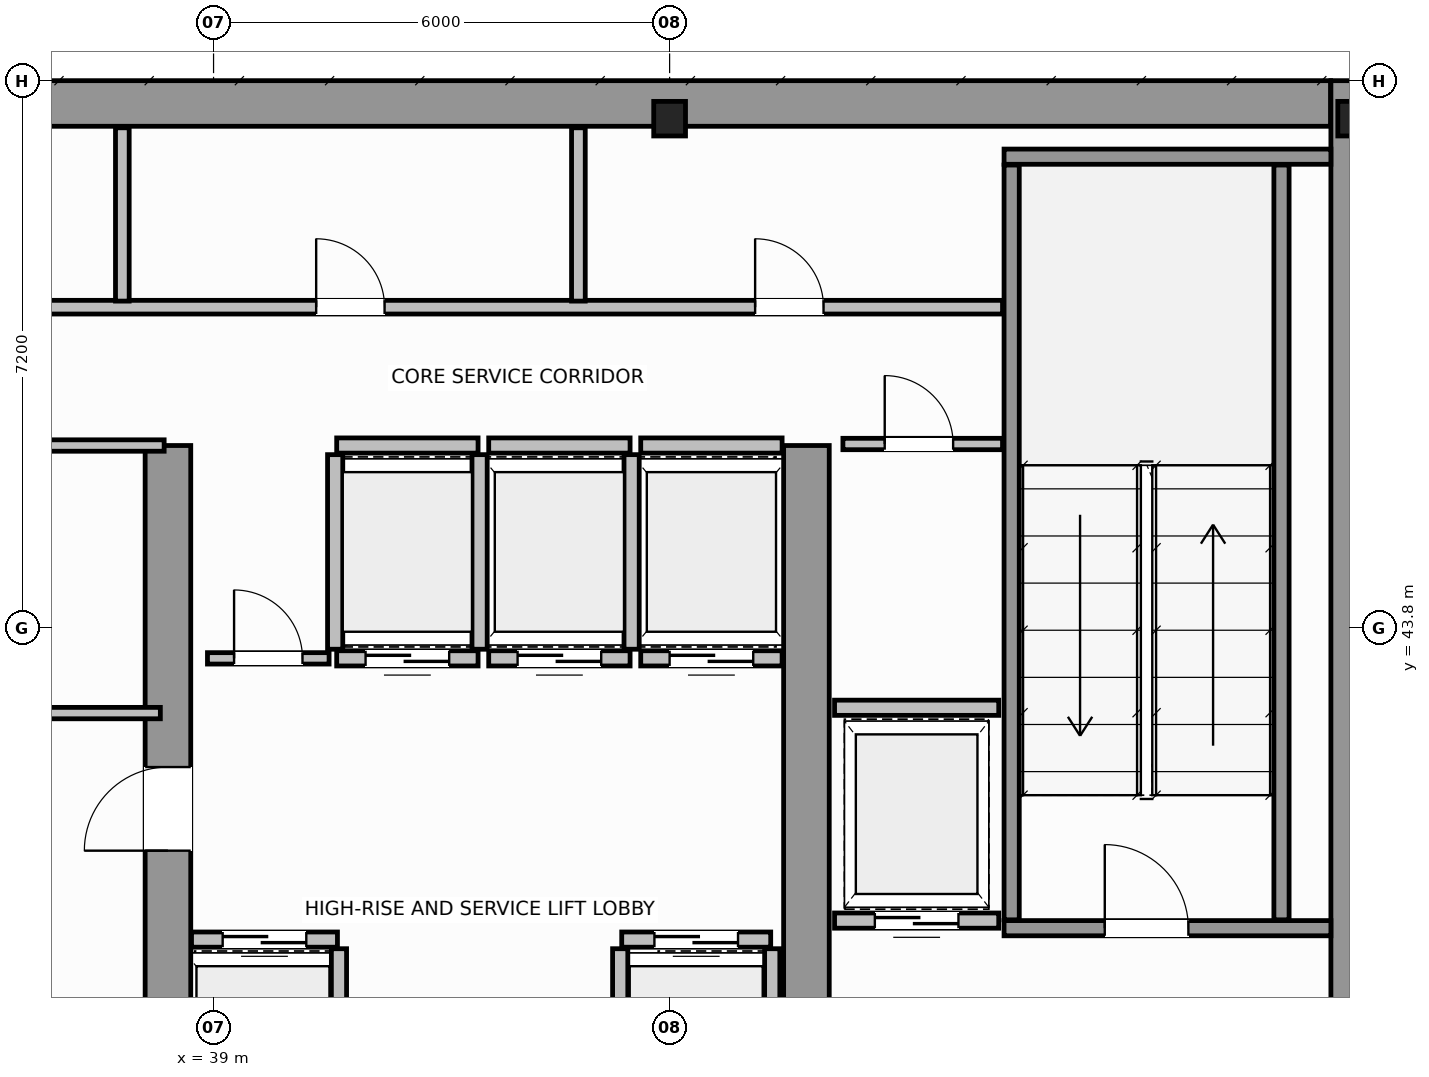
"""IFC4 building model, lengths in metres.
Left out: names, types, materials, properties, quantities, classifications, styles, units other than length and angle.
Written with IfcOpenShell. Run it as: python <this file> out.ifc"""

import sys

from ifc_helpers import new_model, si_unit, direction, frame, frame_2d, origin, origin_2d, place, context, subcontext, project, spatial, rectangle, i_section, extrude, source, transform, mapped, element, fill, save


model = new_model("IFC4")
c1 = context("Model", 3, precision=1e-05, world=origin(), true_north=direction((0.0, 1.0)))
c2 = subcontext(c1, "Body", "Model", "MODEL_VIEW")
j1 = project(units=[si_unit("LENGTHUNIT", "METRE"), si_unit("PLANEANGLEUNIT", "RADIAN")], contexts=[c1])
p1 = place(None, origin())
s1 = spatial("IfcSite", under=j1, at=p1, CompositionType="ELEMENT")
p2 = place(p1, origin())
s2 = spatial("IfcBuilding", under=s1, at=p2, CompositionType="ELEMENT")
p3 = place(p2, frame((0.0, 0.0, 218.4)))
s3 = spatial("IfcBuildingStorey", under=s2, at=p3, CompositionType="ELEMENT", Elevation=218.4)
m1 = source(origin(), c2, "Body", "SweptSolid", [
    extrude(i_section(OverallWidth=0.418, OverallDepth=0.455, WebThickness=0.042, FlangeThickness=0.058, FilletRadius=0.015, at=origin_2d()), origin(), (0.0, 0.0, 1.0), 4.8),
])
for number, where, z_axis, x_axis in (
    (1, (45.0, 50.5, 0.0), (0.0, 0.0, 1.0), (1.0, 0.0, 0.0)),
    (2, (54.0, 50.5, 0.0), (0.0, 0.0, 1.0), (1.0, 0.0, 0.0)),
):
    element("IfcColumn", number, at=place(p3, frame(where, z_axis=z_axis, x_axis=x_axis)), inside=s3, PredefinedType="COLUMN", context=c2, shape_type="MappedRepresentation", body=[
        mapped(m1, transform((0.0, 0.0, 0.0), scale=1.0)),
    ])
p4 = place(p3, frame((34.002, 50.7, 0.0), z_axis=(0.0, 0.0, 1.0), x_axis=(1.0, 0.0, 0.0)))
e3 = element("IfcWall", 3, at=p4, inside=s3, PredefinedType="SHEAR", context=c2, shape_type="SweptSolid", body=[
    extrude(rectangle(XDim=19.694, YDim=0.6, at=frame_2d((9.847, 0.0))), origin(), (0.0, 0.0, 1.0), 4.8),
])
p5 = place(p3, frame((54.0, 36.5, 0.0), z_axis=(0.0, 0.0, 1.0), x_axis=(0.0, 1.0, 0.0)))
e4 = element("IfcWall", 4, at=p5, inside=s3, PredefinedType="SHEAR", context=c2, shape_type="SweptSolid", body=[
    extrude(rectangle(XDim=14.5, YDim=0.6, at=frame_2d((7.25, 0.0))), origin(), (0.0, 0.0, 1.0), 4.8),
])
p6 = place(p3, frame((38.4, 36.82, 0.0), z_axis=(0.0, 0.0, 1.0), x_axis=(0.0, 1.0, 0.0)))
e5 = element("IfcWall", 5, at=p6, inside=s3, PredefinedType="SHEAR", context=c2, shape_type="SweptSolid", body=[
    extrude(rectangle(XDim=9.38, YDim=0.6, at=frame_2d((4.69, 0.0))), origin(), (0.0, 0.0, 1.0), 4.8),
])
p7 = place(p6, frame((4.05, 0.0, 0.0)))
e6 = element("IfcOpeningElement", 6, at=p7, cuts=e5, PredefinedType="OPENING", context=c2, shape_type="SweptSolid", body=[
    extrude(rectangle(XDim=1.1, YDim=2.15, at=frame_2d((0.55, 1.075))), frame((0.0, 0.31, 0.0), z_axis=(0.0, -1.0, 0.0), x_axis=(1.0, 0.0, 0.0)), (0.0, 0.0, 1.0), 0.62),
])
p8 = place(p3, frame((46.8, 36.82, 0.0), z_axis=(0.0, 0.0, 1.0), x_axis=(0.0, 1.0, 0.0)))
e7 = element("IfcWall", 7, at=p8, inside=s3, PredefinedType="SHEAR", context=c2, shape_type="SweptSolid", body=[
    extrude(rectangle(XDim=9.38, YDim=0.6, at=frame_2d((4.69, 0.0))), origin(), (0.0, 0.0, 1.0), 4.8),
])
p9 = place(p3, frame((49.4, 39.85, 0.0), z_axis=(0.0, 0.0, 1.0), x_axis=(1.0, 0.0, 0.0)))
e8 = element("IfcWall", 8, at=p9, inside=s3, PredefinedType="SOLIDWALL", context=c2, shape_type="SweptSolid", body=[
    extrude(rectangle(XDim=4.3, YDim=0.2, at=frame_2d((2.15, 0.0))), origin(), (0.0, 0.0, 1.0), 4.8),
])
p10 = place(p9, frame((1.325, 0.0, 0.0)))
e9 = element("IfcOpeningElement", 9, at=p10, cuts=e8, PredefinedType="OPENING", context=c2, shape_type="SweptSolid", body=[
    extrude(rectangle(XDim=1.1, YDim=2.15, at=frame_2d((0.55, 1.075))), frame((0.0, 0.11, 0.0), z_axis=(0.0, -1.0, 0.0), x_axis=(1.0, 0.0, 0.0)), (0.0, 0.0, 1.0), 0.22),
])
p11 = place(p3, frame((49.4, 50.0, 0.0), z_axis=(0.0, 0.0, 1.0), x_axis=(1.0, 0.0, 0.0)))
e10 = element("IfcWall", 10, at=p11, inside=s3, PredefinedType="SOLIDWALL", context=c2, shape_type="SweptSolid", body=[
    extrude(rectangle(XDim=4.3, YDim=0.2, at=frame_2d((2.15, 0.0))), origin(), (0.0, 0.0, 1.0), 4.8),
])
for number, where, z_axis, x_axis in (
    (11, (49.5, 39.96, 0.0), (0.0, 0.0, 1.0), (0.0, 1.0, 0.0)),
    (12, (53.05, 39.96, 0.0), (0.0, 0.0, 1.0), (0.0, 1.0, 0.0)),
):
    element("IfcWall", number, at=place(p3, frame(where, z_axis=z_axis, x_axis=x_axis)), inside=s3, PredefinedType="SOLIDWALL", context=c2, shape_type="SweptSolid", body=[
        extrude(rectangle(XDim=9.93, YDim=0.2, at=frame_2d((4.965, 0.0))), origin(), (0.0, 0.0, 1.0), 4.8),
    ])
p12 = place(p3, frame((38.71, 39.7, 0.0), z_axis=(0.0, 0.0, 1.0), x_axis=(1.0, 0.0, 0.0)))
e13 = element("IfcWall", 13, at=p12, inside=s3, PredefinedType="SOLIDWALL", context=c2, shape_type="SweptSolid", body=[
    extrude(rectangle(XDim=1.92, YDim=0.2, at=frame_2d((0.96, 0.0))), origin(), (0.0, 0.0, 1.0), 4.54),
])
p13 = place(p12, frame((0.41, 0.0, 0.0)))
e14 = element("IfcOpeningElement", 14, at=p13, cuts=e13, PredefinedType="OPENING", context=c2, shape_type="SweptSolid", body=[
    extrude(rectangle(XDim=1.1, YDim=2.15, at=frame_2d((0.55, 1.075))), frame((0.0, 0.11, 0.0), z_axis=(0.0, -1.0, 0.0), x_axis=(1.0, 0.0, 0.0)), (0.0, 0.0, 1.0), 0.22),
])
p14 = place(p3, frame((40.65, 37.02, 0.0), z_axis=(0.0, 0.0, 1.0), x_axis=(0.0, 1.0, 0.0)))
e15 = element("IfcWall", 15, at=p14, inside=s3, PredefinedType="SOLIDWALL", context=c2, shape_type="SweptSolid", body=[
    extrude(rectangle(XDim=2.56, YDim=0.2, at=frame_2d((1.28, 0.0))), origin(), (0.0, 0.0, 1.0), 4.54),
])
p15 = place(p3, frame((44.37, 39.7, 0.0), z_axis=(0.0, 0.0, 1.0), x_axis=(1.0, 0.0, 0.0)))
e16 = element("IfcWall", 16, at=p15, inside=s3, PredefinedType="SOLIDWALL", context=c2, shape_type="SweptSolid", body=[
    extrude(rectangle(XDim=1.96, YDim=0.2, at=frame_2d((0.98, 0.0))), origin(), (0.0, 0.0, 1.0), 4.54),
])
p16 = place(p15, frame((0.43, 0.0, 0.0)))
e17 = element("IfcOpeningElement", 17, at=p16, cuts=e16, PredefinedType="OPENING", context=c2, shape_type="SweptSolid", body=[
    extrude(rectangle(XDim=1.1, YDim=2.15, at=frame_2d((0.55, 1.075))), frame((0.0, 0.11, 0.0), z_axis=(0.0, -1.0, 0.0), x_axis=(1.0, 0.0, 0.0)), (0.0, 0.0, 1.0), 0.22),
])
for number, where, z_axis, x_axis in (
    (18, (44.35, 37.02, 0.0), (0.0, 0.0, 1.0), (0.0, 1.0, 0.0)),
    (19, (46.35, 37.02, 0.0), (0.0, 0.0, 1.0), (0.0, 1.0, 0.0)),
):
    element("IfcWall", number, at=place(p3, frame(where, z_axis=z_axis, x_axis=x_axis)), inside=s3, PredefinedType="SOLIDWALL", context=c2, shape_type="SweptSolid", body=[
        extrude(rectangle(XDim=2.56, YDim=0.2, at=frame_2d((1.28, 0.0))), origin(), (0.0, 0.0, 1.0), 4.54),
    ])
p17 = place(p3, frame((40.62, 43.4, 0.0), z_axis=(0.0, 0.0, 1.0), x_axis=(1.0, 0.0, 0.0)))
e20 = element("IfcWall", 20, at=p17, inside=s3, PredefinedType="SOLIDWALL", context=c2, shape_type="SweptSolid", body=[
    extrude(rectangle(XDim=1.86, YDim=0.2, at=frame_2d((0.93, 0.0))), origin(), (0.0, 0.0, 1.0), 4.54),
])
p18 = place(p17, frame((0.38, 0.0, 0.0)))
e21 = element("IfcOpeningElement", 21, at=p18, cuts=e20, PredefinedType="OPENING", context=c2, shape_type="SweptSolid", body=[
    extrude(rectangle(XDim=1.1, YDim=2.15, at=frame_2d((0.55, 1.075))), frame((0.0, 0.11, 0.0), z_axis=(0.0, -1.0, 0.0), x_axis=(1.0, 0.0, 0.0)), (0.0, 0.0, 1.0), 0.22),
])
p19 = place(p3, frame((40.62, 46.2, 0.0), z_axis=(0.0, 0.0, 1.0), x_axis=(1.0, 0.0, 0.0)))
e22 = element("IfcWall", 22, at=p19, inside=s3, PredefinedType="SOLIDWALL", context=c2, shape_type="SweptSolid", body=[
    extrude(rectangle(XDim=1.86, YDim=0.2, at=frame_2d((0.93, 0.0))), origin(), (0.0, 0.0, 1.0), 4.54),
])
for number, where, z_axis, x_axis in (
    (23, (40.6, 43.52, 0.0), (0.0, 0.0, 1.0), (0.0, 1.0, 0.0)),
    (24, (42.5, 43.52, 0.0), (0.0, 0.0, 1.0), (0.0, 1.0, 0.0)),
):
    element("IfcWall", number, at=place(p3, frame(where, z_axis=z_axis, x_axis=x_axis)), inside=s3, PredefinedType="SOLIDWALL", context=c2, shape_type="SweptSolid", body=[
        extrude(rectangle(XDim=2.56, YDim=0.2, at=frame_2d((1.28, 0.0))), origin(), (0.0, 0.0, 1.0), 4.54),
    ])
p20 = place(p3, frame((42.62, 43.4, 0.0), z_axis=(0.0, 0.0, 1.0), x_axis=(1.0, 0.0, 0.0)))
e25 = element("IfcWall", 25, at=p20, inside=s3, PredefinedType="SOLIDWALL", context=c2, shape_type="SweptSolid", body=[
    extrude(rectangle(XDim=1.86, YDim=0.2, at=frame_2d((0.93, 0.0))), origin(), (0.0, 0.0, 1.0), 4.54),
])
p21 = place(p20, frame((0.38, 0.0, 0.0)))
e26 = element("IfcOpeningElement", 26, at=p21, cuts=e25, PredefinedType="OPENING", context=c2, shape_type="SweptSolid", body=[
    extrude(rectangle(XDim=1.1, YDim=2.15, at=frame_2d((0.55, 1.075))), frame((0.0, 0.11, 0.0), z_axis=(0.0, -1.0, 0.0), x_axis=(1.0, 0.0, 0.0)), (0.0, 0.0, 1.0), 0.22),
])
p22 = place(p3, frame((42.62, 46.2, 0.0), z_axis=(0.0, 0.0, 1.0), x_axis=(1.0, 0.0, 0.0)))
e27 = element("IfcWall", 27, at=p22, inside=s3, PredefinedType="SOLIDWALL", context=c2, shape_type="SweptSolid", body=[
    extrude(rectangle(XDim=1.86, YDim=0.2, at=frame_2d((0.93, 0.0))), origin(), (0.0, 0.0, 1.0), 4.54),
])
p23 = place(p3, frame((44.5, 43.52, 0.0), z_axis=(0.0, 0.0, 1.0), x_axis=(0.0, 1.0, 0.0)))
e28 = element("IfcWall", 28, at=p23, inside=s3, PredefinedType="SOLIDWALL", context=c2, shape_type="SweptSolid", body=[
    extrude(rectangle(XDim=2.56, YDim=0.2, at=frame_2d((1.28, 0.0))), origin(), (0.0, 0.0, 1.0), 4.54),
])
p24 = place(p3, frame((44.62, 43.4, 0.0), z_axis=(0.0, 0.0, 1.0), x_axis=(1.0, 0.0, 0.0)))
e29 = element("IfcWall", 29, at=p24, inside=s3, PredefinedType="SOLIDWALL", context=c2, shape_type="SweptSolid", body=[
    extrude(rectangle(XDim=1.86, YDim=0.2, at=frame_2d((0.93, 0.0))), origin(), (0.0, 0.0, 1.0), 4.54),
])
p25 = place(p24, frame((0.38, 0.0, 0.0)))
e30 = element("IfcOpeningElement", 30, at=p25, cuts=e29, PredefinedType="OPENING", context=c2, shape_type="SweptSolid", body=[
    extrude(rectangle(XDim=1.1, YDim=2.15, at=frame_2d((0.55, 1.075))), frame((0.0, 0.11, 0.0), z_axis=(0.0, -1.0, 0.0), x_axis=(1.0, 0.0, 0.0)), (0.0, 0.0, 1.0), 0.22),
])
p26 = place(p3, frame((44.62, 46.2, 0.0), z_axis=(0.0, 0.0, 1.0), x_axis=(1.0, 0.0, 0.0)))
e31 = element("IfcWall", 31, at=p26, inside=s3, PredefinedType="SOLIDWALL", context=c2, shape_type="SweptSolid", body=[
    extrude(rectangle(XDim=1.86, YDim=0.2, at=frame_2d((0.93, 0.0))), origin(), (0.0, 0.0, 1.0), 4.54),
])
p27 = place(p3, frame((47.17, 39.95, 0.0), z_axis=(0.0, 0.0, 1.0), x_axis=(1.0, 0.0, 0.0)))
e32 = element("IfcWall", 32, at=p27, inside=s3, PredefinedType="SOLIDWALL", context=c2, shape_type="SweptSolid", body=[
    extrude(rectangle(XDim=2.16, YDim=0.2, at=frame_2d((1.08, 0.0))), origin(), (0.0, 0.0, 1.0), 4.54),
])
p28 = place(p27, frame((0.53, 0.0, 0.0)))
e33 = element("IfcOpeningElement", 33, at=p28, cuts=e32, PredefinedType="OPENING", context=c2, shape_type="SweptSolid", body=[
    extrude(rectangle(XDim=1.1, YDim=2.15, at=frame_2d((0.55, 1.075))), frame((0.0, 0.11, 0.0), z_axis=(0.0, -1.0, 0.0), x_axis=(1.0, 0.0, 0.0)), (0.0, 0.0, 1.0), 0.22),
])
p29 = place(p3, frame((47.17, 42.75, 0.0), z_axis=(0.0, 0.0, 1.0), x_axis=(1.0, 0.0, 0.0)))
e34 = element("IfcWall", 34, at=p29, inside=s3, PredefinedType="SOLIDWALL", context=c2, shape_type="SweptSolid", body=[
    extrude(rectangle(XDim=2.16, YDim=0.2, at=frame_2d((1.08, 0.0))), origin(), (0.0, 0.0, 1.0), 4.54),
])
p30 = place(p3, frame((29.85, 46.2, 0.0), z_axis=(0.0, 0.0, 1.0), x_axis=(1.0, 0.0, 0.0)))
e35 = element("IfcWall", 35, at=p30, inside=s3, PredefinedType="PARTITIONING", context=c2, shape_type="SweptSolid", body=[
    extrude(rectangle(XDim=8.5, YDim=0.15, at=frame_2d((4.25, 0.0))), origin(), (0.0, 0.0, 1.0), 4.54),
])
p31 = place(p3, frame((29.9, 42.68, 0.0), z_axis=(0.0, 0.0, 1.0), x_axis=(1.0, 0.0, 0.0)))
e36 = element("IfcWall", 36, at=p31, inside=s3, PredefinedType="PARTITIONING", context=c2, shape_type="SweptSolid", body=[
    extrude(rectangle(XDim=8.4, YDim=0.15, at=frame_2d((4.2, 0.0))), origin(), (0.0, 0.0, 1.0), 4.54),
])
p32 = place(p31, frame((3.4, 0.0, 0.0)))
e37 = element("IfcOpeningElement", 37, at=p32, cuts=e36, PredefinedType="OPENING", context=c2, shape_type="SweptSolid", body=[
    extrude(rectangle(XDim=0.9, YDim=2.1, at=frame_2d((0.45, 1.05))), frame((0.0, 0.085, 0.0), z_axis=(0.0, -1.0, 0.0), x_axis=(1.0, 0.0, 0.0)), (0.0, 0.0, 1.0), 0.17),
])
p33 = place(p3, frame((47.28, 46.22, 0.0), z_axis=(0.0, 0.0, 1.0), x_axis=(1.0, 0.0, 0.0)))
e38 = element("IfcWall", 38, at=p33, inside=s3, PredefinedType="PARTITIONING", context=c2, shape_type="SweptSolid", body=[
    extrude(rectangle(XDim=2.1, YDim=0.15, at=frame_2d((1.05, 0.0))), origin(), (0.0, 0.0, 1.0), 4.54),
])
p34 = place(p33, frame((0.55, 0.0, 0.0)))
e39 = element("IfcOpeningElement", 39, at=p34, cuts=e38, PredefinedType="OPENING", context=c2, shape_type="SweptSolid", body=[
    extrude(rectangle(XDim=0.9, YDim=2.1, at=frame_2d((0.45, 1.05))), frame((0.0, 0.085, 0.0), z_axis=(0.0, -1.0, 0.0), x_axis=(1.0, 0.0, 0.0)), (0.0, 0.0, 1.0), 0.17),
])
p35 = place(p3, frame((38.92, 43.4, 0.0), z_axis=(0.0, 0.0, 1.0), x_axis=(1.0, 0.0, 0.0)))
e40 = element("IfcWall", 40, at=p35, inside=s3, PredefinedType="PARTITIONING", context=c2, shape_type="SweptSolid", body=[
    extrude(rectangle(XDim=1.6, YDim=0.15, at=frame_2d((0.8, 0.0))), origin(), (0.0, 0.0, 1.0), 4.54),
])
p36 = place(p35, frame((0.35, 0.0, 0.0)))
e41 = element("IfcOpeningElement", 41, at=p36, cuts=e40, PredefinedType="OPENING", context=c2, shape_type="SweptSolid", body=[
    extrude(rectangle(XDim=0.9, YDim=2.1, at=frame_2d((0.45, 1.05))), frame((0.0, 0.085, 0.0), z_axis=(0.0, -1.0, 0.0), x_axis=(1.0, 0.0, 0.0)), (0.0, 0.0, 1.0), 0.17),
])
p37 = place(p3, frame((18.62, 48.02, 0.0), z_axis=(0.0, 0.0, 1.0), x_axis=(1.0, 0.0, 0.0)))
e42 = element("IfcWall", 42, at=p37, inside=s3, PredefinedType="PLUMBINGWALL", context=c2, shape_type="SweptSolid", body=[
    extrude(rectangle(XDim=30.76, YDim=0.18, at=frame_2d((15.38, 0.0))), origin(), (0.0, 0.0, 1.0), 4.54),
])
p38 = place(p37, frame((1.655, 0.0, 0.0)))
e43 = element("IfcOpeningElement", 43, at=p38, cuts=e42, PredefinedType="OPENING", context=c2, shape_type="SweptSolid", body=[
    extrude(rectangle(XDim=0.9, YDim=2.15, at=frame_2d((0.45, 1.075))), frame((0.0, 0.1, 0.0), z_axis=(0.0, -1.0, 0.0), x_axis=(1.0, 0.0, 0.0)), (0.0, 0.0, 1.0), 0.2),
])
p39 = place(p37, frame((6.03, 0.0, 0.0)))
e44 = element("IfcOpeningElement", 44, at=p39, cuts=e42, PredefinedType="OPENING", context=c2, shape_type="SweptSolid", body=[
    extrude(rectangle(XDim=0.9, YDim=2.15, at=frame_2d((0.45, 1.075))), frame((0.0, 0.1, 0.0), z_axis=(0.0, -1.0, 0.0), x_axis=(1.0, 0.0, 0.0)), (0.0, 0.0, 1.0), 0.2),
])
p40 = place(p37, frame((10.93, 0.0, 0.0)))
e45 = element("IfcOpeningElement", 45, at=p40, cuts=e42, PredefinedType="OPENING", context=c2, shape_type="SweptSolid", body=[
    extrude(rectangle(XDim=0.9, YDim=2.15, at=frame_2d((0.45, 1.075))), frame((0.0, 0.1, 0.0), z_axis=(0.0, -1.0, 0.0), x_axis=(1.0, 0.0, 0.0)), (0.0, 0.0, 1.0), 0.2),
])
p41 = place(p37, frame((16.13, 0.0, 0.0)))
e46 = element("IfcOpeningElement", 46, at=p41, cuts=e42, PredefinedType="OPENING", context=c2, shape_type="SweptSolid", body=[
    extrude(rectangle(XDim=0.9, YDim=2.15, at=frame_2d((0.45, 1.075))), frame((0.0, 0.1, 0.0), z_axis=(0.0, -1.0, 0.0), x_axis=(1.0, 0.0, 0.0)), (0.0, 0.0, 1.0), 0.2),
])
p42 = place(p37, frame((21.73, 0.0, 0.0)))
e47 = element("IfcOpeningElement", 47, at=p42, cuts=e42, PredefinedType="OPENING", context=c2, shape_type="SweptSolid", body=[
    extrude(rectangle(XDim=0.9, YDim=2.15, at=frame_2d((0.45, 1.075))), frame((0.0, 0.1, 0.0), z_axis=(0.0, -1.0, 0.0), x_axis=(1.0, 0.0, 0.0)), (0.0, 0.0, 1.0), 0.2),
])
p43 = place(p37, frame((27.505, 0.0, 0.0)))
e48 = element("IfcOpeningElement", 48, at=p43, cuts=e42, PredefinedType="OPENING", context=c2, shape_type="SweptSolid", body=[
    extrude(rectangle(XDim=0.9, YDim=2.15, at=frame_2d((0.45, 1.075))), frame((0.0, 0.1, 0.0), z_axis=(0.0, -1.0, 0.0), x_axis=(1.0, 0.0, 0.0)), (0.0, 0.0, 1.0), 0.2),
])
for number, where, z_axis, x_axis in (
    (49, (37.8, 48.1, 0.0), (0.0, 0.0, 1.0), (0.0, 1.0, 0.0)),
    (50, (43.8, 48.1, 0.0), (0.0, 0.0, 1.0), (0.0, 1.0, 0.0)),
):
    element("IfcWall", number, at=place(p3, frame(where, z_axis=z_axis, x_axis=x_axis)), inside=s3, PredefinedType="PLUMBINGWALL", context=c2, shape_type="SweptSolid", body=[
        extrude(rectangle(XDim=2.28, YDim=0.18, at=frame_2d((1.14, 0.0))), origin(), (0.0, 0.0, 1.0), 4.54),
    ])
m2 = source(origin(), c2, "Body", "SweptSolid", [
    extrude(rectangle(XDim=1.1, YDim=2.15, at=frame_2d((0.55, 1.075))), frame((0.0, 0.025, 0.0), z_axis=(0.0, -1.0, 0.0), x_axis=(1.0, 0.0, 0.0)), (0.0, 0.0, 1.0), 0.05),
])
p44 = place(p10, origin())
e51 = element("IfcDoor", 51, at=p44, inside=s3, OperationType="SINGLE_SWING_RIGHT", PredefinedType="DOOR", context=c2, shape_type="MappedRepresentation", body=[
    mapped(m2, transform((0.0, 0.0, 0.0), scale=1.0)),
])
fill(e9, e51)
p45 = place(p13, origin())
e52 = element("IfcDoor", 52, at=p45, inside=s3, OperationType="DOUBLE_DOOR_SLIDING", PredefinedType="DOOR", context=c2, shape_type="MappedRepresentation", body=[
    mapped(m2, transform((0.0, 0.0, 0.0), scale=1.0)),
])
fill(e14, e52)
p46 = place(p16, origin())
e53 = element("IfcDoor", 53, at=p46, inside=s3, OperationType="DOUBLE_DOOR_SLIDING", PredefinedType="DOOR", context=c2, shape_type="MappedRepresentation", body=[
    mapped(m2, transform((0.0, 0.0, 0.0), scale=1.0)),
])
fill(e17, e53)
p47 = place(p18, origin())
e54 = element("IfcDoor", 54, at=p47, inside=s3, OperationType="DOUBLE_DOOR_SLIDING", PredefinedType="DOOR", context=c2, shape_type="MappedRepresentation", body=[
    mapped(m2, transform((0.0, 0.0, 0.0), scale=1.0)),
])
fill(e21, e54)
p48 = place(p21, origin())
e55 = element("IfcDoor", 55, at=p48, inside=s3, OperationType="DOUBLE_DOOR_SLIDING", PredefinedType="DOOR", context=c2, shape_type="MappedRepresentation", body=[
    mapped(m2, transform((0.0, 0.0, 0.0), scale=1.0)),
])
fill(e26, e55)
p49 = place(p25, origin())
e56 = element("IfcDoor", 56, at=p49, inside=s3, OperationType="DOUBLE_DOOR_SLIDING", PredefinedType="DOOR", context=c2, shape_type="MappedRepresentation", body=[
    mapped(m2, transform((0.0, 0.0, 0.0), scale=1.0)),
])
fill(e30, e56)
p50 = place(p28, origin())
e57 = element("IfcDoor", 57, at=p50, inside=s3, OperationType="DOUBLE_DOOR_SLIDING", PredefinedType="DOOR", context=c2, shape_type="MappedRepresentation", body=[
    mapped(m2, transform((0.0, 0.0, 0.0), scale=1.0)),
])
fill(e33, e57)
p51 = place(p7, origin())
e58 = element("IfcDoor", 58, at=p51, inside=s3, OperationType="SINGLE_SWING_RIGHT", PredefinedType="DOOR", context=c2, shape_type="MappedRepresentation", body=[
    mapped(m2, transform((0.0, 0.0, 0.0), scale=1.0)),
])
fill(e6, e58)
m3 = source(origin(), c2, "Body", "SweptSolid", [
    extrude(rectangle(XDim=0.9, YDim=2.1, at=frame_2d((0.45, 1.05))), frame((0.0, 0.025, 0.0), z_axis=(0.0, -1.0, 0.0), x_axis=(1.0, 0.0, 0.0)), (0.0, 0.0, 1.0), 0.05),
])
p52 = place(p34, origin())
e59 = element("IfcDoor", 59, at=p52, inside=s3, OperationType="SINGLE_SWING_RIGHT", PredefinedType="DOOR", context=c2, shape_type="MappedRepresentation", body=[
    mapped(m3, transform((0.0, 0.0, 0.0), scale=1.0)),
])
fill(e39, e59)
p53 = place(p36, origin())
e60 = element("IfcDoor", 60, at=p53, inside=s3, OperationType="SINGLE_SWING_LEFT", PredefinedType="DOOR", context=c2, shape_type="MappedRepresentation", body=[
    mapped(m3, transform((0.0, 0.0, 0.0), scale=1.0)),
])
fill(e41, e60)
m4 = source(origin(), c2, "Body", "SweptSolid", [
    extrude(rectangle(XDim=0.9, YDim=2.15, at=frame_2d((0.45, 1.075))), frame((0.0, 0.025, 0.0), z_axis=(0.0, -1.0, 0.0), x_axis=(1.0, 0.0, 0.0)), (0.0, 0.0, 1.0), 0.05),
])
p54 = place(p42, origin())
e61 = element("IfcDoor", 61, at=p54, inside=s3, OperationType="SINGLE_SWING_LEFT", PredefinedType="DOOR", context=c2, shape_type="MappedRepresentation", body=[
    mapped(m4, transform((0.0, 0.0, 0.0), scale=1.0)),
])
fill(e47, e61)
p55 = place(p43, origin())
e62 = element("IfcDoor", 62, at=p55, inside=s3, OperationType="SINGLE_SWING_RIGHT", PredefinedType="DOOR", context=c2, shape_type="MappedRepresentation", body=[
    mapped(m4, transform((0.0, 0.0, 0.0), scale=1.0)),
])
fill(e48, e62)
save(model, sys.argv[1])
